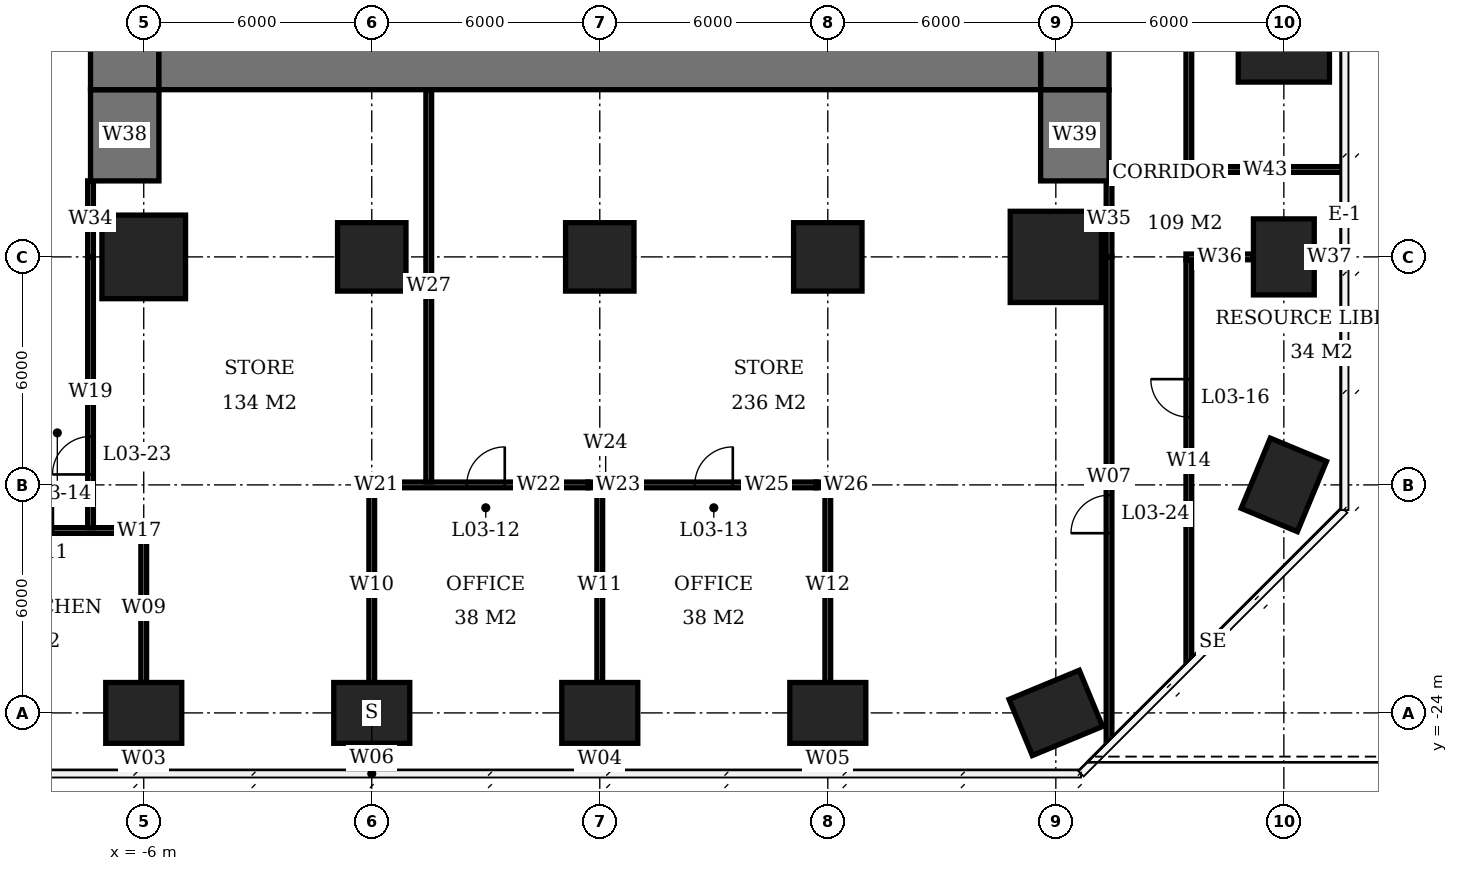
"""IFC4 building model, lengths in metres.
Left out: names, types, materials, properties, quantities, classifications, styles, units other than length and angle.
Written with IfcOpenShell. Run it as: python <this file> out.ifc"""

import sys

from ifc_helpers import new_model, si_unit, direction, frame, frame_2d, origin, origin_2d, place, context, subcontext, project, spatial, rectangle, extrude, element, fill, save


model = new_model("IFC4")
c1 = context("Model", 3, precision=1e-05, world=origin(), true_north=direction((0.0, 1.0)))
c2 = subcontext(c1, "Body", "Model", "MODEL_VIEW")
j1 = project(units=[si_unit("LENGTHUNIT", "METRE"), si_unit("PLANEANGLEUNIT", "RADIAN")], contexts=[c1])
p1 = place(None, origin())
s1 = spatial("IfcSite", under=j1, at=p1, CompositionType="ELEMENT")
p2 = place(p1, origin())
s2 = spatial("IfcBuilding", under=s1, at=p2, CompositionType="ELEMENT")
p3 = place(p2, frame((0.0, 0.0, 18.2)))
s3 = spatial("IfcBuildingStorey", under=s2, at=p3, CompositionType="ELEMENT", Elevation=18.2)
p4 = place(p3, frame((-6.0, -24.0, 0.0), z_axis=(0.0, 0.0, 1.0), x_axis=(1.0, 0.0, 0.0)))
e1 = element("IfcColumn", 1, at=p4, inside=s3, PredefinedType="COLUMN", context=c2, shape_type="SweptSolid", body=[
    extrude(rectangle(XDim=2.0, YDim=1.6, at=origin_2d()), origin(), (0.0, 0.0, 1.0), 3.9),
])
p5 = place(p3, frame((-6.0, -12.0, 0.0), z_axis=(0.0, 0.0, 1.0), x_axis=(1.0, 0.0, 0.0)))
e2 = element("IfcColumn", 2, at=p5, inside=s3, PredefinedType="COLUMN", context=c2, shape_type="SweptSolid", body=[
    extrude(rectangle(XDim=2.2, YDim=2.2, at=origin_2d()), origin(), (0.0, 0.0, 1.0), 3.9),
])
p6 = place(p3, frame((0.0, -24.0, 0.0), z_axis=(0.0, 0.0, 1.0), x_axis=(1.0, 0.0, 0.0)))
e3 = element("IfcColumn", 3, at=p6, inside=s3, PredefinedType="COLUMN", context=c2, shape_type="SweptSolid", body=[
    extrude(rectangle(XDim=2.0, YDim=1.6, at=origin_2d()), origin(), (0.0, 0.0, 1.0), 3.9),
])
p7 = place(p3, frame((0.0, -12.0, 0.0), z_axis=(0.0, 0.0, 1.0), x_axis=(1.0, 0.0, 0.0)))
e4 = element("IfcColumn", 4, at=p7, inside=s3, PredefinedType="COLUMN", context=c2, shape_type="SweptSolid", body=[
    extrude(rectangle(XDim=1.8, YDim=1.8, at=origin_2d()), origin(), (0.0, 0.0, 1.0), 3.9),
])
p8 = place(p3, frame((6.0, -24.0, 0.0), z_axis=(0.0, 0.0, 1.0), x_axis=(1.0, 0.0, 0.0)))
e5 = element("IfcColumn", 5, at=p8, inside=s3, PredefinedType="COLUMN", context=c2, shape_type="SweptSolid", body=[
    extrude(rectangle(XDim=2.0, YDim=1.6, at=origin_2d()), origin(), (0.0, 0.0, 1.0), 3.9),
])
p9 = place(p3, frame((6.0, -12.0, 0.0), z_axis=(0.0, 0.0, 1.0), x_axis=(1.0, 0.0, 0.0)))
e6 = element("IfcColumn", 6, at=p9, inside=s3, PredefinedType="COLUMN", context=c2, shape_type="SweptSolid", body=[
    extrude(rectangle(XDim=1.8, YDim=1.8, at=origin_2d()), origin(), (0.0, 0.0, 1.0), 3.9),
])
p10 = place(p3, frame((12.0, -24.0, 0.0), z_axis=(0.0, 0.0, 1.0), x_axis=(1.0, 0.0, 0.0)))
e7 = element("IfcColumn", 7, at=p10, inside=s3, PredefinedType="COLUMN", context=c2, shape_type="SweptSolid", body=[
    extrude(rectangle(XDim=2.0, YDim=1.6, at=origin_2d()), origin(), (0.0, 0.0, 1.0), 3.9),
])
p11 = place(p3, frame((12.0, -12.0, 0.0), z_axis=(0.0, 0.0, 1.0), x_axis=(1.0, 0.0, 0.0)))
e8 = element("IfcColumn", 8, at=p11, inside=s3, PredefinedType="COLUMN", context=c2, shape_type="SweptSolid", body=[
    extrude(rectangle(XDim=1.8, YDim=1.8, at=origin_2d()), origin(), (0.0, 0.0, 1.0), 3.9),
])
p12 = place(p3, frame((18.0, -24.0, 0.0), z_axis=(0.0, 0.0, 1.0), x_axis=(-0.923879532511, -0.382683432365, 0.0)))
e9 = element("IfcColumn", 9, at=p12, inside=s3, PredefinedType="COLUMN", context=c2, shape_type="SweptSolid", body=[
    extrude(rectangle(XDim=2.0, YDim=1.6, at=origin_2d()), origin(), (0.0, 0.0, 1.0), 3.9),
])
p13 = place(p3, frame((18.0, -12.0, 0.0), z_axis=(0.0, 0.0, 1.0), x_axis=(1.0, 0.0, 0.0)))
e10 = element("IfcColumn", 10, at=p13, inside=s3, PredefinedType="COLUMN", context=c2, shape_type="SweptSolid", body=[
    extrude(rectangle(XDim=2.4, YDim=2.4, at=origin_2d()), origin(), (0.0, 0.0, 1.0), 3.9),
])
for number, where, z_axis, x_axis in (
    (11, (24.0, -18.0, 0.0), (0.0, 0.0, 1.0), (-0.383, -0.924, 0.0)),
    (12, (24.0, -12.0, 0.0), (0.0, 0.0, 1.0), (0.0, 1.0, 0.0)),
):
    element("IfcColumn", number, at=place(p3, frame(where, z_axis=z_axis, x_axis=x_axis)), inside=s3, PredefinedType="COLUMN", context=c2, shape_type="SweptSolid", body=[
        extrude(rectangle(XDim=2.0, YDim=1.6, at=origin_2d()), origin(), (0.0, 0.0, 1.0), 3.9),
    ])
p14 = place(p3, frame((24.0, -6.0, 0.0), z_axis=(0.0, 0.0, 1.0), x_axis=(0.0, 1.0, 0.0)))
e13 = element("IfcColumn", 13, at=p14, inside=s3, PredefinedType="COLUMN", context=c2, shape_type="SweptSolid", body=[
    extrude(rectangle(XDim=2.8, YDim=2.4, at=origin_2d()), origin(), (0.0, 0.0, 1.0), 3.9),
])
p15 = place(p3, frame((-5.6, -6.6, 0.0), z_axis=(0.0, 0.0, 1.0), x_axis=(1.0, 0.0, 0.0)))
e14 = element("IfcWall", 14, at=p15, inside=s3, PredefinedType="SHEAR", context=c2, shape_type="SweptSolid", body=[
    extrude(rectangle(XDim=23.2, YDim=2.0, at=frame_2d((11.6, 0.0))), origin(), (0.0, 0.0, 1.0), 3.9),
])
p16 = place(p3, frame((-6.5, -7.6, 0.0), z_axis=(0.0, 0.0, 1.0), x_axis=(0.0, 1.0, 0.0)))
e15 = element("IfcWall", 15, at=p16, inside=s3, PredefinedType="SHEAR", context=c2, shape_type="SweptSolid", body=[
    extrude(rectangle(XDim=21.2, YDim=1.8, at=frame_2d((10.6, 0.0))), origin(), (0.0, 0.0, 1.0), 3.9),
])
p17 = place(p16, frame((7.8, 0.0, 0.0)))
e16 = element("IfcOpeningElement", 16, at=p17, cuts=e15, PredefinedType="OPENING", context=c2, shape_type="SweptSolid", body=[
    extrude(rectangle(XDim=1.8, YDim=2.4, at=frame_2d((0.9, 1.2))), frame((0.0, 0.91, 0.0), z_axis=(0.0, -1.0, 0.0), x_axis=(1.0, 0.0, 0.0)), (0.0, 0.0, 1.0), 1.82),
])
p18 = place(p3, frame((18.5, -7.6, 0.0), z_axis=(0.0, 0.0, 1.0), x_axis=(0.0, 1.0, 0.0)))
e17 = element("IfcWall", 17, at=p18, inside=s3, PredefinedType="SHEAR", context=c2, shape_type="SweptSolid", body=[
    extrude(rectangle(XDim=21.2, YDim=1.8, at=frame_2d((10.6, 0.0))), origin(), (0.0, 0.0, 1.0), 3.9),
])
p19 = place(p18, frame((9.2, 0.0, 0.0)))
e18 = element("IfcOpeningElement", 18, at=p19, cuts=e17, PredefinedType="OPENING", context=c2, shape_type="SweptSolid", body=[
    extrude(rectangle(XDim=1.8, YDim=2.4, at=frame_2d((0.9, 1.2))), frame((0.0, 0.91, 0.0), z_axis=(0.0, -1.0, 0.0), x_axis=(1.0, 0.0, 0.0)), (0.0, 0.0, 1.0), 1.82),
])
for number, where, z_axis, x_axis in (
    (19, (-6.5, -10.0, 0.0), (0.0, 0.0, 1.0), (0.0, 1.0, 0.0)),
    (20, (18.5, -10.0, 0.0), (0.0, 0.0, 1.0), (0.0, 1.0, 0.0)),
):
    element("IfcWall", number, at=place(p3, frame(where, z_axis=z_axis, x_axis=x_axis)), inside=s3, PredefinedType="SHEAR", context=c2, shape_type="SweptSolid", body=[
        extrude(rectangle(XDim=2.4, YDim=1.8, at=frame_2d((1.2, 0.0))), origin(), (0.0, 0.0, 1.0), 3.9),
    ])
p20 = place(p3, frame((-11.69, -19.2, 0.0), z_axis=(0.0, 0.0, 1.0), x_axis=(1.0, 0.0, 0.0)))
e21 = element("IfcWall", 21, at=p20, inside=s3, PredefinedType="PARTITIONING", context=c2, shape_type="SweptSolid", body=[
    extrude(rectangle(XDim=5.38, YDim=0.15, at=frame_2d((2.69, 0.0))), origin(), (0.0, 0.0, 1.0), 3.65),
])
p21 = place(p20, frame((2.3, 0.0, 0.0)))
e22 = element("IfcOpeningElement", 22, at=p21, cuts=e21, PredefinedType="OPENING", context=c2, shape_type="SweptSolid", body=[
    extrude(rectangle(XDim=1.0, YDim=2.1, at=frame_2d((0.5, 1.05))), frame((0.0, 0.085, 0.0), z_axis=(0.0, -1.0, 0.0), x_axis=(1.0, 0.0, 0.0)), (0.0, 0.0, 1.0), 0.17),
])
for number, where, z_axis, x_axis in (
    (23, (-6.31, -19.2, 0.0), (0.0, 0.0, 1.0), (1.0, 0.0, 0.0)),
    (24, (-0.075, -18.0, 0.0), (0.0, 0.0, 1.0), (1.0, 0.0, 0.0)),
):
    element("IfcWall", number, at=place(p3, frame(where, z_axis=z_axis, x_axis=x_axis)), inside=s3, PredefinedType="PARTITIONING", context=c2, shape_type="SweptSolid", body=[
        extrude(rectangle(XDim=0.385, YDim=0.15, at=frame_2d((0.192, 0.0))), origin(), (0.0, 0.0, 1.0), 3.05),
    ])
p22 = place(p3, frame((0.31, -18.0, 0.0), z_axis=(0.0, 0.0, 1.0), x_axis=(1.0, 0.0, 0.0)))
e25 = element("IfcWall", 25, at=p22, inside=s3, PredefinedType="PARTITIONING", context=c2, shape_type="SweptSolid", body=[
    extrude(rectangle(XDim=5.38, YDim=0.15, at=frame_2d((2.69, 0.0))), origin(), (0.0, 0.0, 1.0), 3.65),
])
p23 = place(p22, frame((2.19, 0.0, 0.0)))
e26 = element("IfcOpeningElement", 26, at=p23, cuts=e25, PredefinedType="OPENING", context=c2, shape_type="SweptSolid", body=[
    extrude(rectangle(XDim=1.0, YDim=2.1, at=frame_2d((0.5, 1.05))), frame((0.0, 0.085, 0.0), z_axis=(0.0, -1.0, 0.0), x_axis=(1.0, 0.0, 0.0)), (0.0, 0.0, 1.0), 0.17),
])
p24 = place(p3, frame((5.69, -18.0, 0.0), z_axis=(0.0, 0.0, 1.0), x_axis=(1.0, 0.0, 0.0)))
e27 = element("IfcWall", 27, at=p24, inside=s3, PredefinedType="PARTITIONING", context=c2, shape_type="SweptSolid", body=[
    extrude(rectangle(XDim=0.385, YDim=0.15, at=frame_2d((0.192, 0.0))), origin(), (0.0, 0.0, 1.0), 3.05),
])
p25 = place(p3, frame((6.0, -18.0, 0.0), z_axis=(0.0, 0.0, 1.0), x_axis=(1.0, 0.0, 0.0)))
e28 = element("IfcWall", 28, at=p25, inside=s3, PredefinedType="PARTITIONING", context=c2, shape_type="SweptSolid", body=[
    extrude(rectangle(XDim=0.31, YDim=0.15, at=frame_2d((0.155, 0.0))), origin(), (0.0, 0.0, 1.0), 3.05),
])
p26 = place(p3, frame((6.31, -18.0, 0.0), z_axis=(0.0, 0.0, 1.0), x_axis=(1.0, 0.0, 0.0)))
e29 = element("IfcWall", 29, at=p26, inside=s3, PredefinedType="PARTITIONING", context=c2, shape_type="SweptSolid", body=[
    extrude(rectangle(XDim=5.38, YDim=0.15, at=frame_2d((2.69, 0.0))), origin(), (0.0, 0.0, 1.0), 3.65),
])
p27 = place(p26, frame((2.19, 0.0, 0.0)))
e30 = element("IfcOpeningElement", 30, at=p27, cuts=e29, PredefinedType="OPENING", context=c2, shape_type="SweptSolid", body=[
    extrude(rectangle(XDim=1.0, YDim=2.1, at=frame_2d((0.5, 1.05))), frame((0.0, 0.085, 0.0), z_axis=(0.0, -1.0, 0.0), x_axis=(1.0, 0.0, 0.0)), (0.0, 0.0, 1.0), 0.17),
])
p28 = place(p3, frame((11.69, -18.0, 0.0), z_axis=(0.0, 0.0, 1.0), x_axis=(1.0, 0.0, 0.0)))
e31 = element("IfcWall", 31, at=p28, inside=s3, PredefinedType="PARTITIONING", context=c2, shape_type="SweptSolid", body=[
    extrude(rectangle(XDim=0.385, YDim=0.15, at=frame_2d((0.192, 0.0))), origin(), (0.0, 0.0, 1.0), 3.05),
])
p29 = place(p3, frame((-6.0, -25.6, 0.0), z_axis=(0.0, 0.0, 1.0), x_axis=(0.0, 1.0, 0.0)))
e32 = element("IfcWall", 32, at=p29, inside=s3, PredefinedType="PARTITIONING", context=c2, shape_type="SweptSolid", body=[
    extrude(rectangle(XDim=0.8, YDim=0.15, at=frame_2d((0.4, 0.0))), origin(), (0.0, 0.0, 1.0), 3.65),
])
p30 = place(p3, frame((-6.0, -23.2, 0.0), z_axis=(0.0, 0.0, 1.0), x_axis=(0.0, 1.0, 0.0)))
e33 = element("IfcWall", 33, at=p30, inside=s3, PredefinedType="PARTITIONING", context=c2, shape_type="SweptSolid", body=[
    extrude(rectangle(XDim=3.925, YDim=0.15, at=frame_2d((1.962, 0.0))), origin(), (0.0, 0.0, 1.0), 3.05),
])
p31 = place(p3, frame((0.0, -25.55, 0.0), z_axis=(0.0, 0.0, 1.0), x_axis=(0.0, 1.0, 0.0)))
e34 = element("IfcWall", 34, at=p31, inside=s3, PredefinedType="PARTITIONING", context=c2, shape_type="SweptSolid", body=[
    extrude(rectangle(XDim=0.75, YDim=0.15, at=frame_2d((0.375, 0.0))), origin(), (0.0, 0.0, 1.0), 3.65),
])
p32 = place(p3, frame((0.0, -23.2, 0.0), z_axis=(0.0, 0.0, 1.0), x_axis=(0.0, 1.0, 0.0)))
e35 = element("IfcWall", 35, at=p32, inside=s3, PredefinedType="PARTITIONING", context=c2, shape_type="SweptSolid", body=[
    extrude(rectangle(XDim=5.125, YDim=0.15, at=frame_2d((2.562, 0.0))), origin(), (0.0, 0.0, 1.0), 3.05),
])
p33 = place(p3, frame((6.0, -25.6, 0.0), z_axis=(0.0, 0.0, 1.0), x_axis=(0.0, 1.0, 0.0)))
e36 = element("IfcWall", 36, at=p33, inside=s3, PredefinedType="PARTITIONING", context=c2, shape_type="SweptSolid", body=[
    extrude(rectangle(XDim=0.8, YDim=0.15, at=frame_2d((0.4, 0.0))), origin(), (0.0, 0.0, 1.0), 3.65),
])
p34 = place(p3, frame((6.0, -23.2, 0.0), z_axis=(0.0, 0.0, 1.0), x_axis=(0.0, 1.0, 0.0)))
e37 = element("IfcWall", 37, at=p34, inside=s3, PredefinedType="PARTITIONING", context=c2, shape_type="SweptSolid", body=[
    extrude(rectangle(XDim=5.125, YDim=0.15, at=frame_2d((2.562, 0.0))), origin(), (0.0, 0.0, 1.0), 3.05),
])
p35 = place(p3, frame((12.0, -25.6, 0.0), z_axis=(0.0, 0.0, 1.0), x_axis=(0.0, 1.0, 0.0)))
e38 = element("IfcWall", 38, at=p35, inside=s3, PredefinedType="PARTITIONING", context=c2, shape_type="SweptSolid", body=[
    extrude(rectangle(XDim=0.8, YDim=0.15, at=frame_2d((0.4, 0.0))), origin(), (0.0, 0.0, 1.0), 3.65),
])
p36 = place(p3, frame((12.0, -23.2, 0.0), z_axis=(0.0, 0.0, 1.0), x_axis=(0.0, 1.0, 0.0)))
e39 = element("IfcWall", 39, at=p36, inside=s3, PredefinedType="PARTITIONING", context=c2, shape_type="SweptSolid", body=[
    extrude(rectangle(XDim=5.125, YDim=0.15, at=frame_2d((2.562, 0.0))), origin(), (0.0, 0.0, 1.0), 3.05),
])
p37 = place(p3, frame((-7.4, -19.125, 0.0), z_axis=(0.0, 0.0, 1.0), x_axis=(0.0, 1.0, 0.0)))
e40 = element("IfcWall", 40, at=p37, inside=s3, PredefinedType="PARTITIONING", context=c2, shape_type="SweptSolid", body=[
    extrude(rectangle(XDim=7.125, YDim=0.15, at=frame_2d((3.562, 0.0))), origin(), (0.0, 0.0, 1.0), 3.65),
])
p38 = place(p37, frame((1.4, 0.0, 0.0)))
e41 = element("IfcOpeningElement", 41, at=p38, cuts=e40, PredefinedType="OPENING", context=c2, shape_type="SweptSolid", body=[
    extrude(rectangle(XDim=1.0, YDim=2.1, at=frame_2d((0.5, 1.05))), frame((0.0, 0.085, 0.0), z_axis=(0.0, -1.0, 0.0), x_axis=(1.0, 0.0, 0.0)), (0.0, 0.0, 1.0), 0.17),
])
p39 = place(p3, frame((-7.4, -12.0, 0.0), z_axis=(0.0, 0.0, 1.0), x_axis=(0.0, 1.0, 0.0)))
e42 = element("IfcWall", 42, at=p39, inside=s3, PredefinedType="PARTITIONING", context=c2, shape_type="SweptSolid", body=[
    extrude(rectangle(XDim=2.0, YDim=0.15, at=frame_2d((1.0, 0.0))), origin(), (0.0, 0.0, 1.0), 3.65),
])
p40 = place(p3, frame((1.5, -17.925, 0.0), z_axis=(0.0, 0.0, 1.0), x_axis=(0.0, 1.0, 0.0)))
e43 = element("IfcWall", 43, at=p40, inside=s3, PredefinedType="PARTITIONING", context=c2, shape_type="SweptSolid", body=[
    extrude(rectangle(XDim=10.325, YDim=0.15, at=frame_2d((5.163, 0.0))), origin(), (0.0, 0.0, 1.0), 3.65),
])
p41 = place(p3, frame((19.4, -24.771, 0.0), z_axis=(0.0, 0.0, 1.0), x_axis=(0.0, 1.0, 0.0)))
e44 = element("IfcWall", 44, at=p41, inside=s3, PredefinedType="PARTITIONING", context=c2, shape_type="SweptSolid", body=[
    extrude(rectangle(XDim=12.771, YDim=0.15, at=frame_2d((6.385, 0.0))), origin(), (0.0, 0.0, 1.0), 3.65),
])
p42 = place(p41, frame((5.5, 0.0, 0.0)))
e45 = element("IfcOpeningElement", 45, at=p42, cuts=e44, PredefinedType="OPENING", context=c2, shape_type="SweptSolid", body=[
    extrude(rectangle(XDim=1.0, YDim=2.1, at=frame_2d((0.5, 1.05))), frame((0.0, 0.085, 0.0), z_axis=(0.0, -1.0, 0.0), x_axis=(1.0, 0.0, 0.0)), (0.0, 0.0, 1.0), 0.17),
])
p43 = place(p3, frame((19.4, -12.0, 0.0), z_axis=(0.0, 0.0, 1.0), x_axis=(0.0, 1.0, 0.0)))
e46 = element("IfcWall", 46, at=p43, inside=s3, PredefinedType="PARTITIONING", context=c2, shape_type="SweptSolid", body=[
    extrude(rectangle(XDim=2.0, YDim=0.15, at=frame_2d((1.0, 0.0))), origin(), (0.0, 0.0, 1.0), 3.65),
])
p44 = place(p3, frame((21.5, -22.671, 0.0), z_axis=(0.0, 0.0, 1.0), x_axis=(0.0, 1.0, 0.0)))
e47 = element("IfcWall", 47, at=p44, inside=s3, PredefinedType="PARTITIONING", context=c2, shape_type="SweptSolid", body=[
    extrude(rectangle(XDim=10.596, YDim=0.15, at=frame_2d((5.298, 0.0))), origin(), (0.0, 0.0, 1.0), 3.65),
])
p45 = place(p44, frame((6.454, 0.0, 0.0)))
e48 = element("IfcOpeningElement", 48, at=p45, cuts=e47, PredefinedType="OPENING", context=c2, shape_type="SweptSolid", body=[
    extrude(rectangle(XDim=1.0, YDim=2.1, at=frame_2d((0.5, 1.05))), frame((0.0, 0.085, 0.0), z_axis=(0.0, -1.0, 0.0), x_axis=(1.0, 0.0, 0.0)), (0.0, 0.0, 1.0), 0.17),
])
p46 = place(p3, frame((21.425, -12.0, 0.0), z_axis=(0.0, 0.0, 1.0), x_axis=(1.0, 0.0, 0.0)))
e49 = element("IfcWall", 49, at=p46, inside=s3, PredefinedType="PARTITIONING", context=c2, shape_type="SweptSolid", body=[
    extrude(rectangle(XDim=1.775, YDim=0.15, at=frame_2d((0.887, 0.0))), origin(), (0.0, 0.0, 1.0), 3.65),
])
p47 = place(p3, frame((24.8, -12.0, 0.0), z_axis=(0.0, 0.0, 1.0), x_axis=(1.0, 0.0, 0.0)))
e50 = element("IfcWall", 50, at=p47, inside=s3, PredefinedType="PARTITIONING", context=c2, shape_type="SweptSolid", body=[
    extrude(rectangle(XDim=0.8, YDim=0.15, at=frame_2d((0.4, 0.0))), origin(), (0.0, 0.0, 1.0), 3.65),
])
p48 = place(p3, frame((21.5, -9.625, 0.0), z_axis=(0.0, 0.0, 1.0), x_axis=(0.0, 1.0, 0.0)))
e51 = element("IfcWall", 51, at=p48, inside=s3, PredefinedType="PARTITIONING", context=c2, shape_type="SweptSolid", body=[
    extrude(rectangle(XDim=32.296, YDim=0.15, at=frame_2d((16.148, 0.0))), origin(), (0.0, 0.0, 1.0), 3.65),
])
p49 = place(p48, frame((20.434, 0.0, 0.0)))
e52 = element("IfcOpeningElement", 52, at=p49, cuts=e51, PredefinedType="OPENING", context=c2, shape_type="SweptSolid", body=[
    extrude(rectangle(XDim=1.0, YDim=2.1, at=frame_2d((0.5, 1.05))), frame((0.0, 0.085, 0.0), z_axis=(0.0, -1.0, 0.0), x_axis=(1.0, 0.0, 0.0)), (0.0, 0.0, 1.0), 0.17),
])
p50 = place(p3, frame((21.425, -9.7, 0.0), z_axis=(0.0, 0.0, 1.0), x_axis=(1.0, 0.0, 0.0)))
e53 = element("IfcWall", 53, at=p50, inside=s3, PredefinedType="PARTITIONING", context=c2, shape_type="SweptSolid", body=[
    extrude(rectangle(XDim=4.175, YDim=0.15, at=frame_2d((2.087, 0.0))), origin(), (0.0, 0.0, 1.0), 3.65),
])
p51 = place(p21, origin())
e54 = element("IfcDoor", 54, at=p51, inside=s3, OperationType="SINGLE_SWING_RIGHT", PredefinedType="DOOR", context=c2, shape_type="SweptSolid", body=[
    extrude(rectangle(XDim=1.0, YDim=2.1, at=frame_2d((0.5, 1.05))), frame((0.0, 0.025, 0.0), z_axis=(0.0, -1.0, 0.0), x_axis=(1.0, 0.0, 0.0)), (0.0, 0.0, 1.0), 0.05),
])
fill(e22, e54)
p52 = place(p23, origin())
e55 = element("IfcDoor", 55, at=p52, inside=s3, OperationType="SINGLE_SWING_RIGHT", PredefinedType="DOOR", context=c2, shape_type="SweptSolid", body=[
    extrude(rectangle(XDim=1.0, YDim=2.1, at=frame_2d((0.5, 1.05))), frame((0.0, 0.025, 0.0), z_axis=(0.0, -1.0, 0.0), x_axis=(1.0, 0.0, 0.0)), (0.0, 0.0, 1.0), 0.05),
])
fill(e26, e55)
p53 = place(p27, origin())
e56 = element("IfcDoor", 56, at=p53, inside=s3, OperationType="SINGLE_SWING_RIGHT", PredefinedType="DOOR", context=c2, shape_type="SweptSolid", body=[
    extrude(rectangle(XDim=1.0, YDim=2.1, at=frame_2d((0.5, 1.05))), frame((0.0, 0.025, 0.0), z_axis=(0.0, -1.0, 0.0), x_axis=(1.0, 0.0, 0.0)), (0.0, 0.0, 1.0), 0.05),
])
fill(e30, e56)
p54 = place(p45, origin())
e57 = element("IfcDoor", 57, at=p54, inside=s3, OperationType="SINGLE_SWING_RIGHT", PredefinedType="DOOR", context=c2, shape_type="SweptSolid", body=[
    extrude(rectangle(XDim=1.0, YDim=2.1, at=frame_2d((0.5, 1.05))), frame((0.0, 0.025, 0.0), z_axis=(0.0, -1.0, 0.0), x_axis=(1.0, 0.0, 0.0)), (0.0, 0.0, 1.0), 0.05),
])
fill(e48, e57)
p55 = place(p38, origin())
e58 = element("IfcDoor", 58, at=p55, inside=s3, OperationType="SINGLE_SWING_LEFT", PredefinedType="DOOR", context=c2, shape_type="SweptSolid", body=[
    extrude(rectangle(XDim=1.0, YDim=2.1, at=frame_2d((0.5, 1.05))), frame((0.0, 0.025, 0.0), z_axis=(0.0, -1.0, 0.0), x_axis=(1.0, 0.0, 0.0)), (0.0, 0.0, 1.0), 0.05),
])
fill(e41, e58)
p56 = place(p42, origin())
e59 = element("IfcDoor", 59, at=p56, inside=s3, OperationType="SINGLE_SWING_LEFT", PredefinedType="DOOR", context=c2, shape_type="SweptSolid", body=[
    extrude(rectangle(XDim=1.0, YDim=2.1, at=frame_2d((0.5, 1.05))), frame((0.0, 0.025, 0.0), z_axis=(0.0, -1.0, 0.0), x_axis=(1.0, 0.0, 0.0)), (0.0, 0.0, 1.0), 0.05),
])
fill(e45, e59)
save(model, sys.argv[1])
